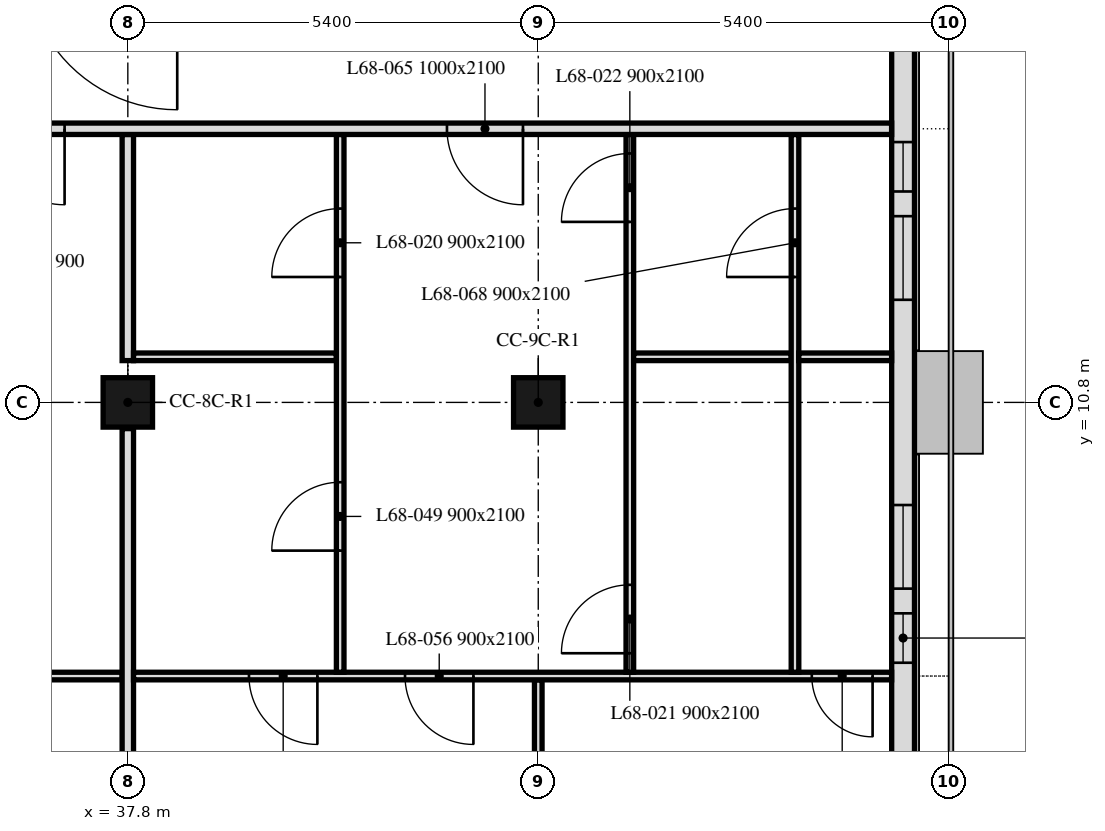
"""IFC4 building model, lengths in metres.
Left out: names, types, materials, properties, quantities, classifications, styles, units other than length and angle.
Written with IfcOpenShell. Run it as: python <this file> out.ifc"""

import sys

from ifc_helpers import new_model, si_unit, direction, frame, frame_2d, origin, origin_2d, place, context, subcontext, project, spatial, rectangle, extrude, element, fill, save


model = new_model("IFC4")
c1 = context("Model", 3, precision=1e-05, world=origin(), true_north=direction((0.0, 1.0)))
c2 = subcontext(c1, "Body", "Model", "MODEL_VIEW")
j1 = project(units=[si_unit("LENGTHUNIT", "METRE"), si_unit("PLANEANGLEUNIT", "RADIAN")], contexts=[c1])
p1 = place(None, origin())
s1 = spatial("IfcSite", under=j1, at=p1, CompositionType="ELEMENT")
p2 = place(p1, origin())
s2 = spatial("IfcBuilding", under=s1, at=p2, CompositionType="ELEMENT")
p3 = place(p2, frame((0.0, 0.0, 278.5)))
s3 = spatial("IfcBuildingStorey", under=s2, at=p3, CompositionType="ELEMENT", Elevation=278.5)
for number, where, z_axis, x_axis in (
    (1, (37.8, 10.8, 0.0), (0.0, 0.0, 1.0), (1.0, 0.0, 0.0)),
    (2, (43.2, 10.8, 0.0), (0.0, 0.0, 1.0), (1.0, 0.0, 0.0)),
):
    element("IfcColumn", number, at=place(p3, frame(where, z_axis=z_axis, x_axis=x_axis)), inside=s3, PredefinedType="COLUMN", context=c2, shape_type="SweptSolid", body=[
        extrude(rectangle(XDim=0.65, YDim=0.65, at=origin_2d()), origin(), (0.0, 0.0, 1.0), 3.0),
    ])
p4 = place(p3, frame((48.0, 5.586, 0.0), z_axis=(0.0, 0.0, 1.0), x_axis=(0.0, 1.0, 0.0)))
e3 = element("IfcWall", 3, at=p4, inside=s3, PredefinedType="SOLIDWALL", context=c2, shape_type="SweptSolid", body=[
    extrude(rectangle(XDim=32.027, YDim=0.3, at=frame_2d((16.014, 0.0))), origin(), (0.0, 0.0, 1.0), 3.0),
])
p5 = place(p4, frame((1.789, 0.0, 0.9)))
e4 = element("IfcOpeningElement", 4, at=p5, cuts=e3, PredefinedType="OPENING", context=c2, shape_type="SweptSolid", body=[
    extrude(rectangle(XDim=0.65, YDim=1.7, at=frame_2d((0.325, 0.85))), frame((0.0, 0.16, 0.0), z_axis=(0.0, -1.0, 0.0), x_axis=(1.0, 0.0, 0.0)), (0.0, 0.0, 1.0), 0.32),
])
p6 = place(p4, frame((2.764, 0.0, 0.9)))
e5 = element("IfcOpeningElement", 5, at=p6, cuts=e3, PredefinedType="OPENING", context=c2, shape_type="SweptSolid", body=[
    extrude(rectangle(XDim=1.1, YDim=1.7, at=frame_2d((0.55, 0.85))), frame((0.0, 0.16, 0.0), z_axis=(0.0, -1.0, 0.0), x_axis=(1.0, 0.0, 0.0)), (0.0, 0.0, 1.0), 0.32),
])
p7 = place(p4, frame((6.564, 0.0, 0.9)))
e6 = element("IfcOpeningElement", 6, at=p7, cuts=e3, PredefinedType="OPENING", context=c2, shape_type="SweptSolid", body=[
    extrude(rectangle(XDim=1.1, YDim=1.7, at=frame_2d((0.55, 0.85))), frame((0.0, 0.16, 0.0), z_axis=(0.0, -1.0, 0.0), x_axis=(1.0, 0.0, 0.0)), (0.0, 0.0, 1.0), 0.32),
])
p8 = place(p4, frame((7.989, 0.0, 0.9)))
e7 = element("IfcOpeningElement", 7, at=p8, cuts=e3, PredefinedType="OPENING", context=c2, shape_type="SweptSolid", body=[
    extrude(rectangle(XDim=0.65, YDim=1.7, at=frame_2d((0.325, 0.85))), frame((0.0, 0.16, 0.0), z_axis=(0.0, -1.0, 0.0), x_axis=(1.0, 0.0, 0.0)), (0.0, 0.0, 1.0), 0.32),
])
p9 = place(p4, frame((11.614, 0.0, 0.9)))
e8 = element("IfcOpeningElement", 8, at=p9, cuts=e3, PredefinedType="OPENING", context=c2, shape_type="SweptSolid", body=[
    extrude(rectangle(XDim=3.4, YDim=1.7, at=frame_2d((1.7, 0.85))), frame((0.0, 0.16, 0.0), z_axis=(0.0, -1.0, 0.0), x_axis=(1.0, 0.0, 0.0)), (0.0, 0.0, 1.0), 0.32),
])
p10 = place(p4, frame((17.364, 0.0, 0.9)))
e9 = element("IfcOpeningElement", 9, at=p10, cuts=e3, PredefinedType="OPENING", context=c2, shape_type="SweptSolid", body=[
    extrude(rectangle(XDim=1.1, YDim=1.7, at=frame_2d((0.55, 0.85))), frame((0.0, 0.16, 0.0), z_axis=(0.0, -1.0, 0.0), x_axis=(1.0, 0.0, 0.0)), (0.0, 0.0, 1.0), 0.32),
])
p11 = place(p4, frame((18.964, 0.0, 0.9)))
e10 = element("IfcOpeningElement", 10, at=p11, cuts=e3, PredefinedType="OPENING", context=c2, shape_type="SweptSolid", body=[
    extrude(rectangle(XDim=1.1, YDim=1.7, at=frame_2d((0.55, 0.85))), frame((0.0, 0.16, 0.0), z_axis=(0.0, -1.0, 0.0), x_axis=(1.0, 0.0, 0.0)), (0.0, 0.0, 1.0), 0.32),
])
p12 = place(p4, frame((22.414, 0.0, 0.9)))
e11 = element("IfcOpeningElement", 11, at=p12, cuts=e3, PredefinedType="OPENING", context=c2, shape_type="SweptSolid", body=[
    extrude(rectangle(XDim=3.4, YDim=1.7, at=frame_2d((1.7, 0.85))), frame((0.0, 0.16, 0.0), z_axis=(0.0, -1.0, 0.0), x_axis=(1.0, 0.0, 0.0)), (0.0, 0.0, 1.0), 0.32),
])
p13 = place(p4, frame((28.789, 0.0, 0.9)))
e12 = element("IfcOpeningElement", 12, at=p13, cuts=e3, PredefinedType="OPENING", context=c2, shape_type="SweptSolid", body=[
    extrude(rectangle(XDim=0.65, YDim=1.7, at=frame_2d((0.325, 0.85))), frame((0.0, 0.16, 0.0), z_axis=(0.0, -1.0, 0.0), x_axis=(1.0, 0.0, 0.0)), (0.0, 0.0, 1.0), 0.32),
])
p14 = place(p4, frame((29.764, 0.0, 0.9)))
e13 = element("IfcOpeningElement", 13, at=p14, cuts=e3, PredefinedType="OPENING", context=c2, shape_type="SweptSolid", body=[
    extrude(rectangle(XDim=1.1, YDim=1.7, at=frame_2d((0.55, 0.85))), frame((0.0, 0.16, 0.0), z_axis=(0.0, -1.0, 0.0), x_axis=(1.0, 0.0, 0.0)), (0.0, 0.0, 1.0), 0.32),
])
p15 = place(p3, frame((37.725, 7.2, 0.0), z_axis=(0.0, 0.0, 1.0), x_axis=(-1.0, 0.0, 0.0)))
e14 = element("IfcWall", 14, at=p15, inside=s3, PredefinedType="PARTITIONING", context=c2, shape_type="SweptSolid", body=[
    extrude(rectangle(XDim=5.25, YDim=0.1, at=frame_2d((2.625, 0.0))), origin(), (0.0, 0.0, 1.0), 3.0),
])
p16 = place(p15, frame((2.89, 0.0, 0.0)))
e15 = element("IfcOpeningElement", 15, at=p16, cuts=e14, PredefinedType="OPENING", context=c2, shape_type="SweptSolid", body=[
    extrude(rectangle(XDim=0.9, YDim=2.1, at=frame_2d((0.45, 1.05))), frame((0.0, 0.05, 0.0), z_axis=(0.0, -1.0, 0.0), x_axis=(1.0, 0.0, 0.0)), (0.0, 0.0, 1.0), 0.1),
])
p17 = place(p15, frame((1.39, 0.0, 0.0)))
e16 = element("IfcOpeningElement", 16, at=p17, cuts=e14, PredefinedType="OPENING", context=c2, shape_type="SweptSolid", body=[
    extrude(rectangle(XDim=0.9, YDim=2.1, at=frame_2d((0.45, 1.05))), frame((0.0, 0.05, 0.0), z_axis=(0.0, -1.0, 0.0), x_axis=(1.0, 0.0, 0.0)), (0.0, 0.0, 1.0), 0.1),
])
p18 = place(p3, frame((37.8, 5.745, 0.0), z_axis=(0.0, 0.0, 1.0), x_axis=(0.0, 1.0, 0.0)))
e17 = element("IfcWall", 17, at=p18, inside=s3, PredefinedType="PARTITIONING", context=c2, shape_type="SweptSolid", body=[
    extrude(rectangle(XDim=4.71, YDim=0.15, at=frame_2d((2.355, 0.0))), origin(), (0.0, 0.0, 1.0), 2.4),
])
p19 = place(p3, frame((37.8, 11.35, 0.0), z_axis=(0.0, 0.0, 1.0), x_axis=(0.0, 1.0, 0.0)))
e18 = element("IfcWall", 18, at=p19, inside=s3, PredefinedType="PARTITIONING", context=c2, shape_type="SweptSolid", body=[
    extrude(rectangle(XDim=2.975, YDim=0.15, at=frame_2d((1.487, 0.0))), origin(), (0.0, 0.0, 1.0), 2.4),
])
p20 = place(p3, frame((43.2, 1.112, 0.0), z_axis=(0.0, 0.0, 1.0), x_axis=(0.0, 1.0, 0.0)))
e19 = element("IfcWall", 19, at=p20, inside=s3, PredefinedType="PARTITIONING", context=c2, shape_type="SweptSolid", body=[
    extrude(rectangle(XDim=6.038, YDim=0.1, at=frame_2d((3.019, 0.0))), origin(), (0.0, 0.0, 1.0), 3.0),
])
p21 = place(p20, frame((2.038, 0.0, 0.0)))
e20 = element("IfcOpeningElement", 20, at=p21, cuts=e19, PredefinedType="OPENING", context=c2, shape_type="SweptSolid", body=[
    extrude(rectangle(XDim=0.9, YDim=2.1, at=frame_2d((0.45, 1.05))), frame((0.0, 0.05, 0.0), z_axis=(0.0, -1.0, 0.0), x_axis=(1.0, 0.0, 0.0)), (0.0, 0.0, 1.0), 0.1),
])
p22 = place(p3, frame((47.849, 7.2, 0.0), z_axis=(0.0, 0.0, 1.0), x_axis=(-1.0, 0.0, 0.0)))
e21 = element("IfcWall", 21, at=p22, inside=s3, PredefinedType="PARTITIONING", context=c2, shape_type="SweptSolid", body=[
    extrude(rectangle(XDim=9.974, YDim=0.1, at=frame_2d((4.987, 0.0))), origin(), (0.0, 0.0, 1.0), 3.0),
])
p23 = place(p22, frame((7.555, 0.0, 0.0)))
e22 = element("IfcOpeningElement", 22, at=p23, cuts=e21, PredefinedType="OPENING", context=c2, shape_type="SweptSolid", body=[
    extrude(rectangle(XDim=0.9, YDim=2.1, at=frame_2d((0.45, 1.05))), frame((0.0, 0.05, 0.0), z_axis=(0.0, -1.0, 0.0), x_axis=(1.0, 0.0, 0.0)), (0.0, 0.0, 1.0), 0.1),
])
p24 = place(p22, frame((5.502, 0.0, 0.0)))
e23 = element("IfcOpeningElement", 23, at=p24, cuts=e21, PredefinedType="OPENING", context=c2, shape_type="SweptSolid", body=[
    extrude(rectangle(XDim=0.9, YDim=2.1, at=frame_2d((0.45, 1.05))), frame((0.0, 0.05, 0.0), z_axis=(0.0, -1.0, 0.0), x_axis=(1.0, 0.0, 0.0)), (0.0, 0.0, 1.0), 0.1),
])
p25 = place(p22, frame((0.25, 0.0, 0.0)))
e24 = element("IfcOpeningElement", 24, at=p25, cuts=e21, PredefinedType="OPENING", context=c2, shape_type="SweptSolid", body=[
    extrude(rectangle(XDim=0.8, YDim=2.1, at=frame_2d((0.4, 1.05))), frame((0.0, 0.05, 0.0), z_axis=(0.0, -1.0, 0.0), x_axis=(1.0, 0.0, 0.0)), (0.0, 0.0, 1.0), 0.1),
])
p26 = place(p3, frame((40.544, 11.4, 0.0), z_axis=(0.0, 0.0, 1.0), x_axis=(-1.0, 0.0, 0.0)))
e25 = element("IfcWall", 25, at=p26, inside=s3, PredefinedType="PARTITIONING", context=c2, shape_type="SweptSolid", body=[
    extrude(rectangle(XDim=2.669, YDim=0.1, at=frame_2d((1.334, 0.0))), origin(), (0.0, 0.0, 1.0), 3.0),
])
p27 = place(p3, frame((40.594, 7.25, 0.0), z_axis=(0.0, 0.0, 1.0), x_axis=(0.0, 1.0, 0.0)))
e26 = element("IfcWall", 26, at=p27, inside=s3, PredefinedType="PARTITIONING", context=c2, shape_type="SweptSolid", body=[
    extrude(rectangle(XDim=7.075, YDim=0.1, at=frame_2d((3.538, 0.0))), origin(), (0.0, 0.0, 1.0), 2.4),
])
p28 = place(p27, frame((5.2, 0.0, 0.0)))
e27 = element("IfcOpeningElement", 27, at=p28, cuts=e26, PredefinedType="OPENING", context=c2, shape_type="SweptSolid", body=[
    extrude(rectangle(XDim=0.9, YDim=2.1, at=frame_2d((0.45, 1.05))), frame((0.0, 0.05, 0.0), z_axis=(0.0, -1.0, 0.0), x_axis=(1.0, 0.0, 0.0)), (0.0, 0.0, 1.0), 0.1),
])
p29 = place(p27, frame((1.6, 0.0, 0.0)))
e28 = element("IfcOpeningElement", 28, at=p29, cuts=e26, PredefinedType="OPENING", context=c2, shape_type="SweptSolid", body=[
    extrude(rectangle(XDim=0.9, YDim=2.1, at=frame_2d((0.45, 1.05))), frame((0.0, 0.05, 0.0), z_axis=(0.0, -1.0, 0.0), x_axis=(1.0, 0.0, 0.0)), (0.0, 0.0, 1.0), 0.1),
])
p30 = place(p3, frame((44.405, 7.25, 0.0), z_axis=(0.0, 0.0, 1.0), x_axis=(0.0, 1.0, 0.0)))
e29 = element("IfcWall", 29, at=p30, inside=s3, PredefinedType="PARTITIONING", context=c2, shape_type="SweptSolid", body=[
    extrude(rectangle(XDim=7.075, YDim=0.1, at=frame_2d((3.538, 0.0))), origin(), (0.0, 0.0, 1.0), 2.4),
])
p31 = place(p30, frame((0.25, 0.0, 0.0)))
e30 = element("IfcOpeningElement", 30, at=p31, cuts=e29, PredefinedType="OPENING", context=c2, shape_type="SweptSolid", body=[
    extrude(rectangle(XDim=0.9, YDim=2.1, at=frame_2d((0.45, 1.05))), frame((0.0, 0.05, 0.0), z_axis=(0.0, -1.0, 0.0), x_axis=(1.0, 0.0, 0.0)), (0.0, 0.0, 1.0), 0.1),
])
p32 = place(p30, frame((5.925, 0.0, 0.0)))
e31 = element("IfcOpeningElement", 31, at=p32, cuts=e29, PredefinedType="OPENING", context=c2, shape_type="SweptSolid", body=[
    extrude(rectangle(XDim=0.9, YDim=2.1, at=frame_2d((0.45, 1.05))), frame((0.0, 0.05, 0.0), z_axis=(0.0, -1.0, 0.0), x_axis=(1.0, 0.0, 0.0)), (0.0, 0.0, 1.0), 0.1),
])
p33 = place(p3, frame((46.528, 11.4, 0.0), z_axis=(0.0, 0.0, 1.0), x_axis=(-1.0, 0.0, 0.0)))
e32 = element("IfcWall", 32, at=p33, inside=s3, PredefinedType="PARTITIONING", context=c2, shape_type="SweptSolid", body=[
    extrude(rectangle(XDim=2.073, YDim=0.1, at=frame_2d((1.037, 0.0))), origin(), (0.0, 0.0, 1.0), 3.0),
])
p34 = place(p3, frame((46.578, 7.25, 0.0), z_axis=(0.0, 0.0, 1.0), x_axis=(0.0, 1.0, 0.0)))
e33 = element("IfcWall", 33, at=p34, inside=s3, PredefinedType="PARTITIONING", context=c2, shape_type="SweptSolid", body=[
    extrude(rectangle(XDim=7.075, YDim=0.1, at=frame_2d((3.538, 0.0))), origin(), (0.0, 0.0, 1.0), 2.4),
])
p35 = place(p34, frame((5.2, 0.0, 0.0)))
e34 = element("IfcOpeningElement", 34, at=p35, cuts=e33, PredefinedType="OPENING", context=c2, shape_type="SweptSolid", body=[
    extrude(rectangle(XDim=0.9, YDim=2.1, at=frame_2d((0.45, 1.05))), frame((0.0, 0.05, 0.0), z_axis=(0.0, -1.0, 0.0), x_axis=(1.0, 0.0, 0.0)), (0.0, 0.0, 1.0), 0.1),
])
p36 = place(p3, frame((47.849, 11.4, 0.0), z_axis=(0.0, 0.0, 1.0), x_axis=(-1.0, 0.0, 0.0)))
e35 = element("IfcWall", 35, at=p36, inside=s3, PredefinedType="PARTITIONING", context=c2, shape_type="SweptSolid", body=[
    extrude(rectangle(XDim=1.221, YDim=0.1, at=frame_2d((0.611, 0.0))), origin(), (0.0, 0.0, 1.0), 3.0),
])
p37 = place(p3, frame((47.849, 14.4, 0.0), z_axis=(0.0, 0.0, 1.0), x_axis=(-1.0, 0.0, 0.0)))
e36 = element("IfcWall", 36, at=p37, inside=s3, PredefinedType="PARTITIONING", context=c2, shape_type="SweptSolid", body=[
    extrude(rectangle(XDim=41.698, YDim=0.15, at=frame_2d((20.849, 0.0))), origin(), (0.0, 0.0, 1.0), 2.4),
])
p38 = place(p37, frame((10.881, 0.0, 0.0)))
e37 = element("IfcOpeningElement", 37, at=p38, cuts=e36, PredefinedType="OPENING", context=c2, shape_type="SweptSolid", body=[
    extrude(rectangle(XDim=1.0, YDim=2.1, at=frame_2d((0.5, 1.05))), frame((0.0, 0.075, 0.0), z_axis=(0.0, -1.0, 0.0), x_axis=(1.0, 0.0, 0.0)), (0.0, 0.0, 1.0), 0.15),
])
p39 = place(p37, frame((37.759, 0.0, 0.0)))
e38 = element("IfcOpeningElement", 38, at=p39, cuts=e36, PredefinedType="OPENING", context=c2, shape_type="SweptSolid", body=[
    extrude(rectangle(XDim=1.0, YDim=2.1, at=frame_2d((0.5, 1.05))), frame((0.0, 0.075, 0.0), z_axis=(0.0, -1.0, 0.0), x_axis=(1.0, 0.0, 0.0)), (0.0, 0.0, 1.0), 0.15),
])
p40 = place(p37, frame((22.815, 0.0, 0.0)))
e39 = element("IfcOpeningElement", 39, at=p40, cuts=e36, PredefinedType="OPENING", context=c2, shape_type="SweptSolid", body=[
    extrude(rectangle(XDim=1.0, YDim=2.1, at=frame_2d((0.5, 1.05))), frame((0.0, 0.075, 0.0), z_axis=(0.0, -1.0, 0.0), x_axis=(1.0, 0.0, 0.0)), (0.0, 0.0, 1.0), 0.15),
])
p41 = place(p37, frame((4.85, 0.0, 0.0)))
e40 = element("IfcOpeningElement", 40, at=p41, cuts=e36, PredefinedType="OPENING", context=c2, shape_type="SweptSolid", body=[
    extrude(rectangle(XDim=1.0, YDim=2.1, at=frame_2d((0.5, 1.05))), frame((0.0, 0.075, 0.0), z_axis=(0.0, -1.0, 0.0), x_axis=(1.0, 0.0, 0.0)), (0.0, 0.0, 1.0), 0.15),
])
p42 = place(p5, origin())
e41 = element("IfcWindow", 41, at=p42, inside=s3, PartitioningType="SINGLE_PANEL", PredefinedType="WINDOW", context=c2, shape_type="SweptSolid", body=[
    extrude(rectangle(XDim=0.65, YDim=1.7, at=frame_2d((0.325, 0.85))), frame((0.0, 0.03, 0.0), z_axis=(0.0, -1.0, 0.0), x_axis=(1.0, 0.0, 0.0)), (0.0, 0.0, 1.0), 0.06),
])
fill(e4, e41)
p43 = place(p6, origin())
e42 = element("IfcWindow", 42, at=p43, inside=s3, PartitioningType="SINGLE_PANEL", PredefinedType="WINDOW", context=c2, shape_type="SweptSolid", body=[
    extrude(rectangle(XDim=1.1, YDim=1.7, at=frame_2d((0.55, 0.85))), frame((0.0, 0.03, 0.0), z_axis=(0.0, -1.0, 0.0), x_axis=(1.0, 0.0, 0.0)), (0.0, 0.0, 1.0), 0.06),
])
fill(e5, e42)
p44 = place(p7, origin())
e43 = element("IfcWindow", 43, at=p44, inside=s3, PartitioningType="SINGLE_PANEL", PredefinedType="WINDOW", context=c2, shape_type="SweptSolid", body=[
    extrude(rectangle(XDim=1.1, YDim=1.7, at=frame_2d((0.55, 0.85))), frame((0.0, 0.03, 0.0), z_axis=(0.0, -1.0, 0.0), x_axis=(1.0, 0.0, 0.0)), (0.0, 0.0, 1.0), 0.06),
])
fill(e6, e43)
p45 = place(p8, origin())
e44 = element("IfcWindow", 44, at=p45, inside=s3, PartitioningType="SINGLE_PANEL", PredefinedType="WINDOW", context=c2, shape_type="SweptSolid", body=[
    extrude(rectangle(XDim=0.65, YDim=1.7, at=frame_2d((0.325, 0.85))), frame((0.0, 0.03, 0.0), z_axis=(0.0, -1.0, 0.0), x_axis=(1.0, 0.0, 0.0)), (0.0, 0.0, 1.0), 0.06),
])
fill(e7, e44)
p46 = place(p28, origin())
e45 = element("IfcDoor", 45, at=p46, inside=s3, OperationType="SINGLE_SWING_LEFT", PredefinedType="DOOR", context=c2, shape_type="SweptSolid", body=[
    extrude(rectangle(XDim=0.9, YDim=2.1, at=frame_2d((0.45, 1.05))), frame((0.0, 0.025, 0.0), z_axis=(0.0, -1.0, 0.0), x_axis=(1.0, 0.0, 0.0)), (0.0, 0.0, 1.0), 0.05),
])
fill(e27, e45)
p47 = place(p31, origin())
e46 = element("IfcDoor", 46, at=p47, inside=s3, OperationType="SINGLE_SWING_RIGHT", PredefinedType="DOOR", context=c2, shape_type="SweptSolid", body=[
    extrude(rectangle(XDim=0.9, YDim=2.1, at=frame_2d((0.45, 1.05))), frame((0.0, 0.025, 0.0), z_axis=(0.0, -1.0, 0.0), x_axis=(1.0, 0.0, 0.0)), (0.0, 0.0, 1.0), 0.05),
])
fill(e30, e46)
p48 = place(p32, origin())
e47 = element("IfcDoor", 47, at=p48, inside=s3, OperationType="SINGLE_SWING_RIGHT", PredefinedType="DOOR", context=c2, shape_type="SweptSolid", body=[
    extrude(rectangle(XDim=0.9, YDim=2.1, at=frame_2d((0.45, 1.05))), frame((0.0, 0.025, 0.0), z_axis=(0.0, -1.0, 0.0), x_axis=(1.0, 0.0, 0.0)), (0.0, 0.0, 1.0), 0.05),
])
fill(e31, e47)
p49 = place(p23, origin())
e48 = element("IfcDoor", 48, at=p49, inside=s3, OperationType="SINGLE_SWING_LEFT", PredefinedType="DOOR", context=c2, shape_type="SweptSolid", body=[
    extrude(rectangle(XDim=0.9, YDim=2.1, at=frame_2d((0.45, 1.05))), frame((0.0, 0.025, 0.0), z_axis=(0.0, -1.0, 0.0), x_axis=(1.0, 0.0, 0.0)), (0.0, 0.0, 1.0), 0.05),
])
fill(e22, e48)
p50 = place(p29, origin())
e49 = element("IfcDoor", 49, at=p50, inside=s3, OperationType="SINGLE_SWING_RIGHT", PredefinedType="DOOR", context=c2, shape_type="SweptSolid", body=[
    extrude(rectangle(XDim=0.9, YDim=2.1, at=frame_2d((0.45, 1.05))), frame((0.0, 0.025, 0.0), z_axis=(0.0, -1.0, 0.0), x_axis=(1.0, 0.0, 0.0)), (0.0, 0.0, 1.0), 0.05),
])
fill(e28, e49)
p51 = place(p24, origin())
e50 = element("IfcDoor", 50, at=p51, inside=s3, OperationType="SINGLE_SWING_RIGHT", PredefinedType="DOOR", context=c2, shape_type="SweptSolid", body=[
    extrude(rectangle(XDim=0.9, YDim=2.1, at=frame_2d((0.45, 1.05))), frame((0.0, 0.025, 0.0), z_axis=(0.0, -1.0, 0.0), x_axis=(1.0, 0.0, 0.0)), (0.0, 0.0, 1.0), 0.05),
])
fill(e23, e50)
p52 = place(p38, origin())
e51 = element("IfcDoor", 51, at=p52, inside=s3, OperationType="SINGLE_SWING_RIGHT", PredefinedType="DOOR", context=c2, shape_type="SweptSolid", body=[
    extrude(rectangle(XDim=1.0, YDim=2.1, at=frame_2d((0.5, 1.05))), frame((0.0, 0.025, 0.0), z_axis=(0.0, -1.0, 0.0), x_axis=(1.0, 0.0, 0.0)), (0.0, 0.0, 1.0), 0.05),
])
fill(e37, e51)
p53 = place(p41, origin())
e52 = element("IfcDoor", 52, at=p53, inside=s3, OperationType="SINGLE_SWING_RIGHT", PredefinedType="DOOR", context=c2, shape_type="SweptSolid", body=[
    extrude(rectangle(XDim=1.0, YDim=2.1, at=frame_2d((0.5, 1.05))), frame((0.0, 0.025, 0.0), z_axis=(0.0, -1.0, 0.0), x_axis=(1.0, 0.0, 0.0)), (0.0, 0.0, 1.0), 0.05),
])
fill(e40, e52)
p54 = place(p25, origin())
e53 = element("IfcDoor", 53, at=p54, inside=s3, OperationType="SINGLE_SWING_RIGHT", PredefinedType="DOOR", context=c2, shape_type="SweptSolid", body=[
    extrude(rectangle(XDim=0.8, YDim=2.1, at=frame_2d((0.4, 1.05))), frame((0.0, 0.025, 0.0), z_axis=(0.0, -1.0, 0.0), x_axis=(1.0, 0.0, 0.0)), (0.0, 0.0, 1.0), 0.05),
])
fill(e24, e53)
p55 = place(p35, origin())
e54 = element("IfcDoor", 54, at=p55, inside=s3, OperationType="SINGLE_SWING_RIGHT", PredefinedType="DOOR", context=c2, shape_type="SweptSolid", body=[
    extrude(rectangle(XDim=0.9, YDim=2.1, at=frame_2d((0.45, 1.05))), frame((0.0, 0.025, 0.0), z_axis=(0.0, -1.0, 0.0), x_axis=(1.0, 0.0, 0.0)), (0.0, 0.0, 1.0), 0.05),
])
fill(e34, e54)
save(model, sys.argv[1])
